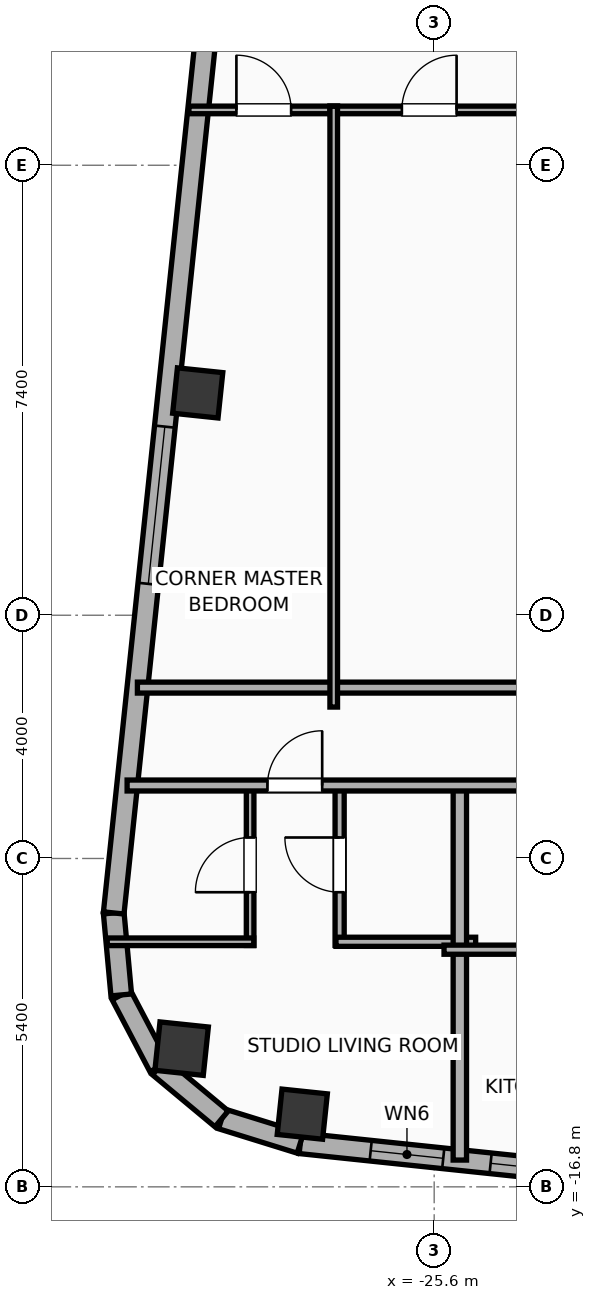
"""IFC4 building model, lengths in metres.
Left out: names, types, materials, properties, quantities, classifications, styles, units other than length and angle.
Written with IfcOpenShell. Run it as: python <this file> out.ifc"""

import sys

from ifc_helpers import new_model, si_unit, direction, frame, frame_2d, origin, origin_2d, place, context, subcontext, project, spatial, rectangle, hollow_rectangle, hollow_circle, extrude, element, fill, save


model = new_model("IFC4")
c1 = context("Model", 3, precision=1e-05, world=origin(), true_north=direction((0.0, 1.0)))
c2 = subcontext(c1, "Body", "Model", "MODEL_VIEW")
j1 = project(units=[si_unit("LENGTHUNIT", "METRE"), si_unit("PLANEANGLEUNIT", "RADIAN")], contexts=[c1])
p1 = place(None, origin())
s1 = spatial("IfcSite", under=j1, at=p1, CompositionType="ELEMENT")
p2 = place(p1, origin())
s2 = spatial("IfcBuilding", under=s1, at=p2, CompositionType="ELEMENT")
p3 = place(p2, frame((0.0, 0.0, 295.1)))
s3 = spatial("IfcBuildingStorey", under=s2, at=p3, CompositionType="ELEMENT", Elevation=295.1)
for number, where, z_axis, x_axis in (
    (1, (-27.769, -15.604, 0.0), (0.0, 0.0, 1.0), (0.995, -0.105, 0.0)),
    (2, (-29.489, -3.744, 0.0), (0.0, 0.0, 1.0), (0.995, -0.105, 0.0)),
):
    element("IfcColumn", number, at=place(p3, frame(where, z_axis=z_axis, x_axis=x_axis)), inside=s3, PredefinedType="COLUMN", context=c2, shape_type="SweptSolid", body=[
        extrude(hollow_rectangle(XDim=0.75, YDim=0.75, WallThickness=0.025, at=origin_2d()), origin(), (0.0, 0.0, 1.0), 3.9),
    ])
p4 = place(p3, frame((-29.753, -14.527, 0.0), z_axis=(0.0, 0.0, 1.0), x_axis=(0.994521895368, -0.104528463268, 0.0)))
e3 = element("IfcColumn", 3, at=p4, inside=s3, PredefinedType="COLUMN", context=c2, shape_type="SweptSolid", body=[
    extrude(hollow_circle(Radius=0.4, WallThickness=0.028, at=origin_2d()), origin(), (0.0, 0.0, 1.0), 3.9),
])
p5 = place(p3, frame((18.708, -20.972, 0.0), z_axis=(0.0, 0.0, 1.0), x_axis=(-0.994521888554, 0.104528528102, 0.0)))
e4 = element("IfcWall", 4, at=p5, inside=s3, PredefinedType="ELEMENTEDWALL", context=c2, shape_type="SweptSolid", body=[
    extrude(rectangle(XDim=46.766, YDim=0.34, at=frame_2d((23.383, 0.0))), origin(), (0.0, 0.0, 1.0), 3.635),
])
p6 = place(p5, frame((23.733, 0.0, 0.65)))
e5 = element("IfcOpeningElement", 5, at=p6, cuts=e4, PredefinedType="OPENING", context=c2, shape_type="SweptSolid", body=[
    extrude(rectangle(XDim=2.6, YDim=2.45, at=frame_2d((1.3, 1.225))), frame((0.0, 0.18, 0.0), z_axis=(0.0, -1.0, 0.0), x_axis=(1.0, 0.0, 0.0)), (0.0, 0.0, 1.0), 0.36),
])
p7 = place(p5, frame((44.402, 0.0, 0.75)))
e6 = element("IfcOpeningElement", 6, at=p7, cuts=e4, PredefinedType="OPENING", context=c2, shape_type="SweptSolid", body=[
    extrude(rectangle(XDim=1.2, YDim=2.05, at=frame_2d((0.6, 1.025))), frame((0.0, 0.18, 0.0), z_axis=(0.0, -1.0, 0.0), x_axis=(1.0, 0.0, 0.0)), (0.0, 0.0, 1.0), 0.36),
])
p8 = place(p5, frame((39.553, 0.0, 0.75)))
e7 = element("IfcOpeningElement", 7, at=p8, cuts=e4, PredefinedType="OPENING", context=c2, shape_type="SweptSolid", body=[
    extrude(rectangle(XDim=1.2, YDim=2.05, at=frame_2d((0.6, 1.025))), frame((0.0, 0.18, 0.0), z_axis=(0.0, -1.0, 0.0), x_axis=(1.0, 0.0, 0.0)), (0.0, 0.0, 1.0), 0.36),
])
p9 = place(p5, frame((42.419, 0.0, 0.75)))
e8 = element("IfcOpeningElement", 8, at=p9, cuts=e4, PredefinedType="OPENING", context=c2, shape_type="SweptSolid", body=[
    extrude(rectangle(XDim=1.2, YDim=2.05, at=frame_2d((0.6, 1.025))), frame((0.0, 0.18, 0.0), z_axis=(0.0, -1.0, 0.0), x_axis=(1.0, 0.0, 0.0)), (0.0, 0.0, 1.0), 0.36),
])
p10 = place(p5, frame((34.933, 0.0, 0.75)))
e9 = element("IfcOpeningElement", 9, at=p10, cuts=e4, PredefinedType="OPENING", context=c2, shape_type="SweptSolid", body=[
    extrude(rectangle(XDim=1.2, YDim=2.05, at=frame_2d((0.6, 1.025))), frame((0.0, 0.18, 0.0), z_axis=(0.0, -1.0, 0.0), x_axis=(1.0, 0.0, 0.0)), (0.0, 0.0, 1.0), 0.36),
])
p11 = place(p5, frame((28.692, 0.0, 0.75)))
e10 = element("IfcOpeningElement", 10, at=p11, cuts=e4, PredefinedType="OPENING", context=c2, shape_type="SweptSolid", body=[
    extrude(rectangle(XDim=1.2, YDim=2.05, at=frame_2d((0.6, 1.025))), frame((0.0, 0.18, 0.0), z_axis=(0.0, -1.0, 0.0), x_axis=(1.0, 0.0, 0.0)), (0.0, 0.0, 1.0), 0.36),
])
p12 = place(p5, frame((30.957, 0.0, 0.75)))
e11 = element("IfcOpeningElement", 11, at=p12, cuts=e4, PredefinedType="OPENING", context=c2, shape_type="SweptSolid", body=[
    extrude(rectangle(XDim=1.2, YDim=2.05, at=frame_2d((0.6, 1.025))), frame((0.0, 0.18, 0.0), z_axis=(0.0, -1.0, 0.0), x_axis=(1.0, 0.0, 0.0)), (0.0, 0.0, 1.0), 0.36),
])
p13 = place(p5, frame((7.495, 0.0, 0.75)))
e12 = element("IfcOpeningElement", 12, at=p13, cuts=e4, PredefinedType="OPENING", context=c2, shape_type="SweptSolid", body=[
    extrude(rectangle(XDim=1.2, YDim=2.05, at=frame_2d((0.6, 1.025))), frame((0.0, 0.18, 0.0), z_axis=(0.0, -1.0, 0.0), x_axis=(1.0, 0.0, 0.0)), (0.0, 0.0, 1.0), 0.36),
])
p14 = place(p5, frame((4.146, 0.0, 0.75)))
e13 = element("IfcOpeningElement", 13, at=p14, cuts=e4, PredefinedType="OPENING", context=c2, shape_type="SweptSolid", body=[
    extrude(rectangle(XDim=1.2, YDim=2.05, at=frame_2d((0.6, 1.025))), frame((0.0, 0.18, 0.0), z_axis=(0.0, -1.0, 0.0), x_axis=(1.0, 0.0, 0.0)), (0.0, 0.0, 1.0), 0.36),
])
p15 = place(p5, frame((1.362, 0.0, 0.75)))
e14 = element("IfcOpeningElement", 14, at=p15, cuts=e4, PredefinedType="OPENING", context=c2, shape_type="SweptSolid", body=[
    extrude(rectangle(XDim=1.2, YDim=2.05, at=frame_2d((0.6, 1.025))), frame((0.0, 0.18, 0.0), z_axis=(0.0, -1.0, 0.0), x_axis=(1.0, 0.0, 0.0)), (0.0, 0.0, 1.0), 0.36),
])
p16 = place(p5, frame((20.254, 0.0, 0.75)))
e15 = element("IfcOpeningElement", 15, at=p16, cuts=e4, PredefinedType="OPENING", context=c2, shape_type="SweptSolid", body=[
    extrude(rectangle(XDim=1.2, YDim=2.05, at=frame_2d((0.6, 1.025))), frame((0.0, 0.18, 0.0), z_axis=(0.0, -1.0, 0.0), x_axis=(1.0, 0.0, 0.0)), (0.0, 0.0, 1.0), 0.36),
])
p17 = place(p5, frame((16.172, 0.0, 0.75)))
e16 = element("IfcOpeningElement", 16, at=p17, cuts=e4, PredefinedType="OPENING", context=c2, shape_type="SweptSolid", body=[
    extrude(rectangle(XDim=1.2, YDim=2.05, at=frame_2d((0.6, 1.025))), frame((0.0, 0.18, 0.0), z_axis=(0.0, -1.0, 0.0), x_axis=(1.0, 0.0, 0.0)), (0.0, 0.0, 1.0), 0.36),
])
p18 = place(p5, frame((12.11, 0.0, 0.75)))
e17 = element("IfcOpeningElement", 17, at=p18, cuts=e4, PredefinedType="OPENING", context=c2, shape_type="SweptSolid", body=[
    extrude(rectangle(XDim=1.2, YDim=2.05, at=frame_2d((0.6, 1.025))), frame((0.0, 0.18, 0.0), z_axis=(0.0, -1.0, 0.0), x_axis=(1.0, 0.0, 0.0)), (0.0, 0.0, 1.0), 0.36),
])
p19 = place(p3, frame((-27.802, -16.084, 0.0), z_axis=(0.0, 0.0, 1.0), x_axis=(-0.955007802701, 0.296580674994, 0.0)))
e18 = element("IfcWall", 18, at=p19, inside=s3, PredefinedType="ELEMENTEDWALL", context=c2, shape_type="SweptSolid", body=[
    extrude(rectangle(XDim=1.354, YDim=0.34, at=frame_2d((0.677, 0.0))), origin(), (0.0, 0.0, 1.0), 3.635),
])
p20 = place(p3, frame((-29.096, -15.682, 0.0), z_axis=(0.0, 0.0, 1.0), x_axis=(-0.768864427906, 0.639411832469, 0.0)))
e19 = element("IfcWall", 19, at=p20, inside=s3, PredefinedType="ELEMENTEDWALL", context=c2, shape_type="SweptSolid", body=[
    extrude(rectangle(XDim=1.337, YDim=0.34, at=frame_2d((0.668, 0.0))), origin(), (0.0, 0.0, 1.0), 3.635),
])
p21 = place(p3, frame((-30.124, -14.827, 0.0), z_axis=(0.0, 0.0, 1.0), x_axis=(-0.465528132217, 0.885033083062, 0.0)))
e20 = element("IfcWall", 20, at=p21, inside=s3, PredefinedType="ELEMENTEDWALL", context=c2, shape_type="SweptSolid", body=[
    extrude(rectangle(XDim=1.337, YDim=0.34, at=frame_2d((0.668, 0.0))), origin(), (0.0, 0.0, 1.0), 3.635),
])
p22 = place(p3, frame((-30.746, -13.644, 0.0), z_axis=(0.0, 0.0, 1.0), x_axis=(-0.091592370975, 0.995796584438, 0.0)))
e21 = element("IfcWall", 21, at=p22, inside=s3, PredefinedType="ELEMENTEDWALL", context=c2, shape_type="SweptSolid", body=[
    extrude(rectangle(XDim=1.354, YDim=0.34, at=frame_2d((0.677, 0.0))), origin(), (0.0, 0.0, 1.0), 3.635),
])
p23 = place(p3, frame((-30.87, -12.296, 0.0), z_axis=(0.0, 0.0, 1.0), x_axis=(0.104533282919, 0.994521388791, 0.0)))
e22 = element("IfcWall", 22, at=p23, inside=s3, PredefinedType="ELEMENTEDWALL", context=c2, shape_type="SweptSolid", body=[
    extrude(rectangle(XDim=30.366, YDim=0.34, at=frame_2d((15.183, 0.0))), origin(), (0.0, 0.0, 1.0), 3.635),
])
p24 = place(p23, frame((5.442, 0.0, 0.65)))
e23 = element("IfcOpeningElement", 23, at=p24, cuts=e22, PredefinedType="OPENING", context=c2, shape_type="SweptSolid", body=[
    extrude(rectangle(XDim=2.6, YDim=2.45, at=frame_2d((1.3, 1.225))), frame((0.0, 0.18, 0.0), z_axis=(0.0, -1.0, 0.0), x_axis=(1.0, 0.0, 0.0)), (0.0, 0.0, 1.0), 0.36),
])
p25 = place(p23, frame((27.067, 0.0, 0.75)))
e24 = element("IfcOpeningElement", 24, at=p25, cuts=e22, PredefinedType="OPENING", context=c2, shape_type="SweptSolid", body=[
    extrude(rectangle(XDim=1.2, YDim=2.05, at=frame_2d((0.6, 1.025))), frame((0.0, 0.18, 0.0), z_axis=(0.0, -1.0, 0.0), x_axis=(1.0, 0.0, 0.0)), (0.0, 0.0, 1.0), 0.36),
])
p26 = place(p23, frame((16.185, 0.0, 0.75)))
e25 = element("IfcOpeningElement", 25, at=p26, cuts=e22, PredefinedType="OPENING", context=c2, shape_type="SweptSolid", body=[
    extrude(rectangle(XDim=1.2, YDim=2.05, at=frame_2d((0.6, 1.025))), frame((0.0, 0.18, 0.0), z_axis=(0.0, -1.0, 0.0), x_axis=(1.0, 0.0, 0.0)), (0.0, 0.0, 1.0), 0.36),
])
p27 = place(p3, frame((-30.481, -8.59, 0.0), z_axis=(0.0, 0.0, 1.0), x_axis=(1.0, 0.0, 0.0)))
e26 = element("IfcWall", 26, at=p27, inside=s3, PredefinedType="PARTITIONING", context=c2, shape_type="SweptSolid", body=[
    extrude(rectangle(XDim=20.601, YDim=0.18, at=frame_2d((10.3, 0.0))), origin(), (0.0, 0.0, 1.0), 3.635),
])
p28 = place(p3, frame((-28.627, -12.83, 0.0), z_axis=(0.0, 0.0, 1.0), x_axis=(0.0, 1.0, 0.0)))
e27 = element("IfcWall", 27, at=p28, inside=s3, PredefinedType="PARTITIONING", context=c2, shape_type="SweptSolid", body=[
    extrude(rectangle(XDim=2.65, YDim=0.125, at=frame_2d((1.325, 0.0))), origin(), (0.0, 0.0, 1.0), 3.635),
])
p29 = place(p28, frame((0.875, 0.0, 0.0)))
e28 = element("IfcOpeningElement", 28, at=p29, cuts=e27, PredefinedType="OPENING", context=c2, shape_type="SweptSolid", body=[
    extrude(rectangle(XDim=0.9, YDim=2.05, at=frame_2d((0.45, 1.025))), frame((0.0, 0.073, 0.0), z_axis=(0.0, -1.0, 0.0), x_axis=(1.0, 0.0, 0.0)), (0.0, 0.0, 1.0), 0.145),
])
p30 = place(p3, frame((-27.155, -12.83, 0.0), z_axis=(0.0, 0.0, 1.0), x_axis=(0.0, 1.0, 0.0)))
e29 = element("IfcWall", 29, at=p30, inside=s3, PredefinedType="PLUMBINGWALL", context=c2, shape_type="SweptSolid", body=[
    extrude(rectangle(XDim=2.65, YDim=0.15, at=frame_2d((1.325, 0.0))), origin(), (0.0, 0.0, 1.0), 3.635),
])
p31 = place(p30, frame((0.875, 0.0, 0.0)))
e30 = element("IfcOpeningElement", 30, at=p31, cuts=e29, PredefinedType="OPENING", context=c2, shape_type="SweptSolid", body=[
    extrude(rectangle(XDim=0.9, YDim=2.05, at=frame_2d((0.45, 1.025))), frame((0.0, 0.085, 0.0), z_axis=(0.0, -1.0, 0.0), x_axis=(1.0, 0.0, 0.0)), (0.0, 0.0, 1.0), 0.17),
])
p32 = place(p3, frame((-30.977, -12.77, 0.0), z_axis=(0.0, 0.0, 1.0), x_axis=(1.0, 0.0, 0.0)))
e31 = element("IfcWall", 31, at=p32, inside=s3, PredefinedType="PARTITIONING", context=c2, shape_type="SweptSolid", body=[
    extrude(rectangle(XDim=2.41, YDim=0.125, at=frame_2d((1.205, 0.0))), origin(), (0.0, 0.0, 1.0), 3.635),
])
p33 = place(p3, frame((-27.215, -12.77, 0.0), z_axis=(0.0, 0.0, 1.0), x_axis=(1.0, 0.0, 0.0)))
e32 = element("IfcWall", 32, at=p33, inside=s3, PredefinedType="PLUMBINGWALL", context=c2, shape_type="SweptSolid", body=[
    extrude(rectangle(XDim=2.297, YDim=0.15, at=frame_2d((1.148, 0.0))), origin(), (0.0, 0.0, 1.0), 3.635),
])
p34 = place(p3, frame((-25.178, -16.36, 0.0), z_axis=(0.0, 0.0, 1.0), x_axis=(0.0, 1.0, 0.0)))
e33 = element("IfcWall", 33, at=p34, inside=s3, PredefinedType="PARTITIONING", context=c2, shape_type="SweptSolid", body=[
    extrude(rectangle(XDim=6.24, YDim=0.22, at=frame_2d((3.12, 0.0))), origin(), (0.0, 0.0, 1.0), 3.635),
])
p35 = place(p3, frame((-25.438, -12.9, 0.0), z_axis=(0.0, 0.0, 1.0), x_axis=(1.0, 0.0, 0.0)))
e34 = element("IfcWall", 34, at=p35, inside=s3, PredefinedType="PLUMBINGWALL", context=c2, shape_type="SweptSolid", body=[
    extrude(rectangle(XDim=2.55, YDim=0.15, at=frame_2d((1.275, 0.0))), origin(), (0.0, 0.0, 1.0), 3.635),
])
p36 = place(p3, frame((-30.65, -10.2, 0.0), z_axis=(0.0, 0.0, 1.0), x_axis=(1.0, 0.0, 0.0)))
e35 = element("IfcWall", 35, at=p36, inside=s3, PredefinedType="PARTITIONING", context=c2, shape_type="SweptSolid", body=[
    extrude(rectangle(XDim=22.57, YDim=0.18, at=frame_2d((11.285, 0.0))), origin(), (0.0, 0.0, 1.0), 3.635),
])
p37 = place(p36, frame((2.308, 0.0, 0.0)))
e36 = element("IfcOpeningElement", 36, at=p37, cuts=e35, PredefinedType="OPENING", context=c2, shape_type="SweptSolid", body=[
    extrude(rectangle(XDim=0.9, YDim=2.05, at=frame_2d((0.45, 1.025))), frame((0.0, 0.1, 0.0), z_axis=(0.0, -1.0, 0.0), x_axis=(1.0, 0.0, 0.0)), (0.0, 0.0, 1.0), 0.2),
])
p38 = place(p36, frame((8.821, 0.0, 0.0)))
e37 = element("IfcOpeningElement", 37, at=p38, cuts=e35, PredefinedType="OPENING", context=c2, shape_type="SweptSolid", body=[
    extrude(rectangle(XDim=1.15, YDim=2.05, at=frame_2d((0.575, 1.025))), frame((0.0, 0.1, 0.0), z_axis=(0.0, -1.0, 0.0), x_axis=(1.0, 0.0, 0.0)), (0.0, 0.0, 1.0), 0.2),
])
p39 = place(p36, frame((13.749, 0.0, 0.0)))
e38 = element("IfcOpeningElement", 38, at=p39, cuts=e35, PredefinedType="OPENING", context=c2, shape_type="SweptSolid", body=[
    extrude(rectangle(XDim=0.9, YDim=2.05, at=frame_2d((0.45, 1.025))), frame((0.0, 0.1, 0.0), z_axis=(0.0, -1.0, 0.0), x_axis=(1.0, 0.0, 0.0)), (0.0, 0.0, 1.0), 0.2),
])
p40 = place(p36, frame((20.221, 0.0, 0.0)))
e39 = element("IfcOpeningElement", 39, at=p40, cuts=e35, PredefinedType="OPENING", context=c2, shape_type="SweptSolid", body=[
    extrude(rectangle(XDim=1.15, YDim=2.05, at=frame_2d((0.575, 1.025))), frame((0.0, 0.1, 0.0), z_axis=(0.0, -1.0, 0.0), x_axis=(1.0, 0.0, 0.0)), (0.0, 0.0, 1.0), 0.2),
])
p41 = place(p3, frame((-29.633, 0.91, 0.0), z_axis=(0.0, 0.0, 1.0), x_axis=(1.0, 0.0, 0.0)))
e40 = element("IfcWall", 40, at=p41, inside=s3, PredefinedType="PARTITIONING", context=c2, shape_type="SweptSolid", body=[
    extrude(rectangle(XDim=2.444, YDim=0.125, at=frame_2d((1.222, 0.0))), origin(), (0.0, 0.0, 1.0), 3.635),
])
p42 = place(p41, frame((0.781, 0.0, 0.0)))
e41 = element("IfcOpeningElement", 41, at=p42, cuts=e40, PredefinedType="OPENING", context=c2, shape_type="SweptSolid", body=[
    extrude(rectangle(XDim=0.9, YDim=2.05, at=frame_2d((0.45, 1.025))), frame((0.0, 0.073, 0.0), z_axis=(0.0, -1.0, 0.0), x_axis=(1.0, 0.0, 0.0)), (0.0, 0.0, 1.0), 0.145),
])
p43 = place(p3, frame((-27.314, 0.91, 0.0), z_axis=(0.0, 0.0, 1.0), x_axis=(1.0, 0.0, 0.0)))
e42 = element("IfcWall", 42, at=p43, inside=s3, PredefinedType="PARTITIONING", context=c2, shape_type="SweptSolid", body=[
    extrude(rectangle(XDim=3.266, YDim=0.125, at=frame_2d((1.633, 0.0))), origin(), (0.0, 0.0, 1.0), 3.635),
])
p44 = place(p43, frame((1.183, 0.0, 0.0)))
e43 = element("IfcOpeningElement", 43, at=p44, cuts=e42, PredefinedType="OPENING", context=c2, shape_type="SweptSolid", body=[
    extrude(rectangle(XDim=0.9, YDim=2.05, at=frame_2d((0.45, 1.025))), frame((0.0, 0.073, 0.0), z_axis=(0.0, -1.0, 0.0), x_axis=(1.0, 0.0, 0.0)), (0.0, 0.0, 1.0), 0.145),
])
p45 = place(p3, frame((-27.252, -8.91, 0.0), z_axis=(0.0, 0.0, 1.0), x_axis=(0.0, 1.0, 0.0)))
e44 = element("IfcWall", 44, at=p45, inside=s3, PredefinedType="PARTITIONING", context=c2, shape_type="SweptSolid", body=[
    extrude(rectangle(XDim=9.88, YDim=0.125, at=frame_2d((4.94, 0.0))), origin(), (0.0, 0.0, 1.0), 3.635),
])
p46 = place(p24, origin())
e45 = element("IfcWindow", 45, at=p46, inside=s3, PartitioningType="SINGLE_PANEL", PredefinedType="WINDOW", context=c2, shape_type="SweptSolid", body=[
    extrude(rectangle(XDim=2.6, YDim=2.45, at=frame_2d((1.3, 1.225))), frame((0.0, 0.03, 0.0), z_axis=(0.0, -1.0, 0.0), x_axis=(1.0, 0.0, 0.0)), (0.0, 0.0, 1.0), 0.06),
])
fill(e23, e45)
p47 = place(p7, origin())
e46 = element("IfcWindow", 46, at=p47, inside=s3, PartitioningType="SINGLE_PANEL", PredefinedType="WINDOW", context=c2, shape_type="SweptSolid", body=[
    extrude(rectangle(XDim=1.2, YDim=2.05, at=frame_2d((0.6, 1.025))), frame((0.0, 0.03, 0.0), z_axis=(0.0, -1.0, 0.0), x_axis=(1.0, 0.0, 0.0)), (0.0, 0.0, 1.0), 0.06),
])
fill(e6, e46)
p48 = place(p9, origin())
e47 = element("IfcWindow", 47, at=p48, inside=s3, PartitioningType="SINGLE_PANEL", PredefinedType="WINDOW", context=c2, shape_type="SweptSolid", body=[
    extrude(rectangle(XDim=1.2, YDim=2.05, at=frame_2d((0.6, 1.025))), frame((0.0, 0.03, 0.0), z_axis=(0.0, -1.0, 0.0), x_axis=(1.0, 0.0, 0.0)), (0.0, 0.0, 1.0), 0.06),
])
fill(e8, e47)
p49 = place(p29, origin())
e48 = element("IfcDoor", 48, at=p49, inside=s3, OperationType="SINGLE_SWING_LEFT", PredefinedType="DOOR", context=c2, shape_type="SweptSolid", body=[
    extrude(rectangle(XDim=0.9, YDim=2.05, at=frame_2d((0.45, 1.025))), frame((0.0, 0.025, 0.0), z_axis=(0.0, -1.0, 0.0), x_axis=(1.0, 0.0, 0.0)), (0.0, 0.0, 1.0), 0.05),
])
fill(e28, e48)
p50 = place(p31, origin())
e49 = element("IfcDoor", 49, at=p50, inside=s3, OperationType="SINGLE_SWING_RIGHT", PredefinedType="DOOR", context=c2, shape_type="SweptSolid", body=[
    extrude(rectangle(XDim=0.9, YDim=2.05, at=frame_2d((0.45, 1.025))), frame((0.0, 0.025, 0.0), z_axis=(0.0, -1.0, 0.0), x_axis=(1.0, 0.0, 0.0)), (0.0, 0.0, 1.0), 0.05),
])
fill(e30, e49)
p51 = place(p37, origin())
e50 = element("IfcDoor", 50, at=p51, inside=s3, OperationType="SINGLE_SWING_RIGHT", PredefinedType="DOOR", context=c2, shape_type="SweptSolid", body=[
    extrude(rectangle(XDim=0.9, YDim=2.05, at=frame_2d((0.45, 1.025))), frame((0.0, 0.025, 0.0), z_axis=(0.0, -1.0, 0.0), x_axis=(1.0, 0.0, 0.0)), (0.0, 0.0, 1.0), 0.05),
])
fill(e36, e50)
p52 = place(p42, origin())
e51 = element("IfcDoor", 51, at=p52, inside=s3, OperationType="SINGLE_SWING_LEFT", PredefinedType="DOOR", context=c2, shape_type="SweptSolid", body=[
    extrude(rectangle(XDim=0.9, YDim=2.05, at=frame_2d((0.45, 1.025))), frame((0.0, 0.025, 0.0), z_axis=(0.0, -1.0, 0.0), x_axis=(1.0, 0.0, 0.0)), (0.0, 0.0, 1.0), 0.05),
])
fill(e41, e51)
p53 = place(p44, origin())
e52 = element("IfcDoor", 52, at=p53, inside=s3, OperationType="SINGLE_SWING_RIGHT", PredefinedType="DOOR", context=c2, shape_type="SweptSolid", body=[
    extrude(rectangle(XDim=0.9, YDim=2.05, at=frame_2d((0.45, 1.025))), frame((0.0, 0.025, 0.0), z_axis=(0.0, -1.0, 0.0), x_axis=(1.0, 0.0, 0.0)), (0.0, 0.0, 1.0), 0.05),
])
fill(e43, e52)
save(model, sys.argv[1])
